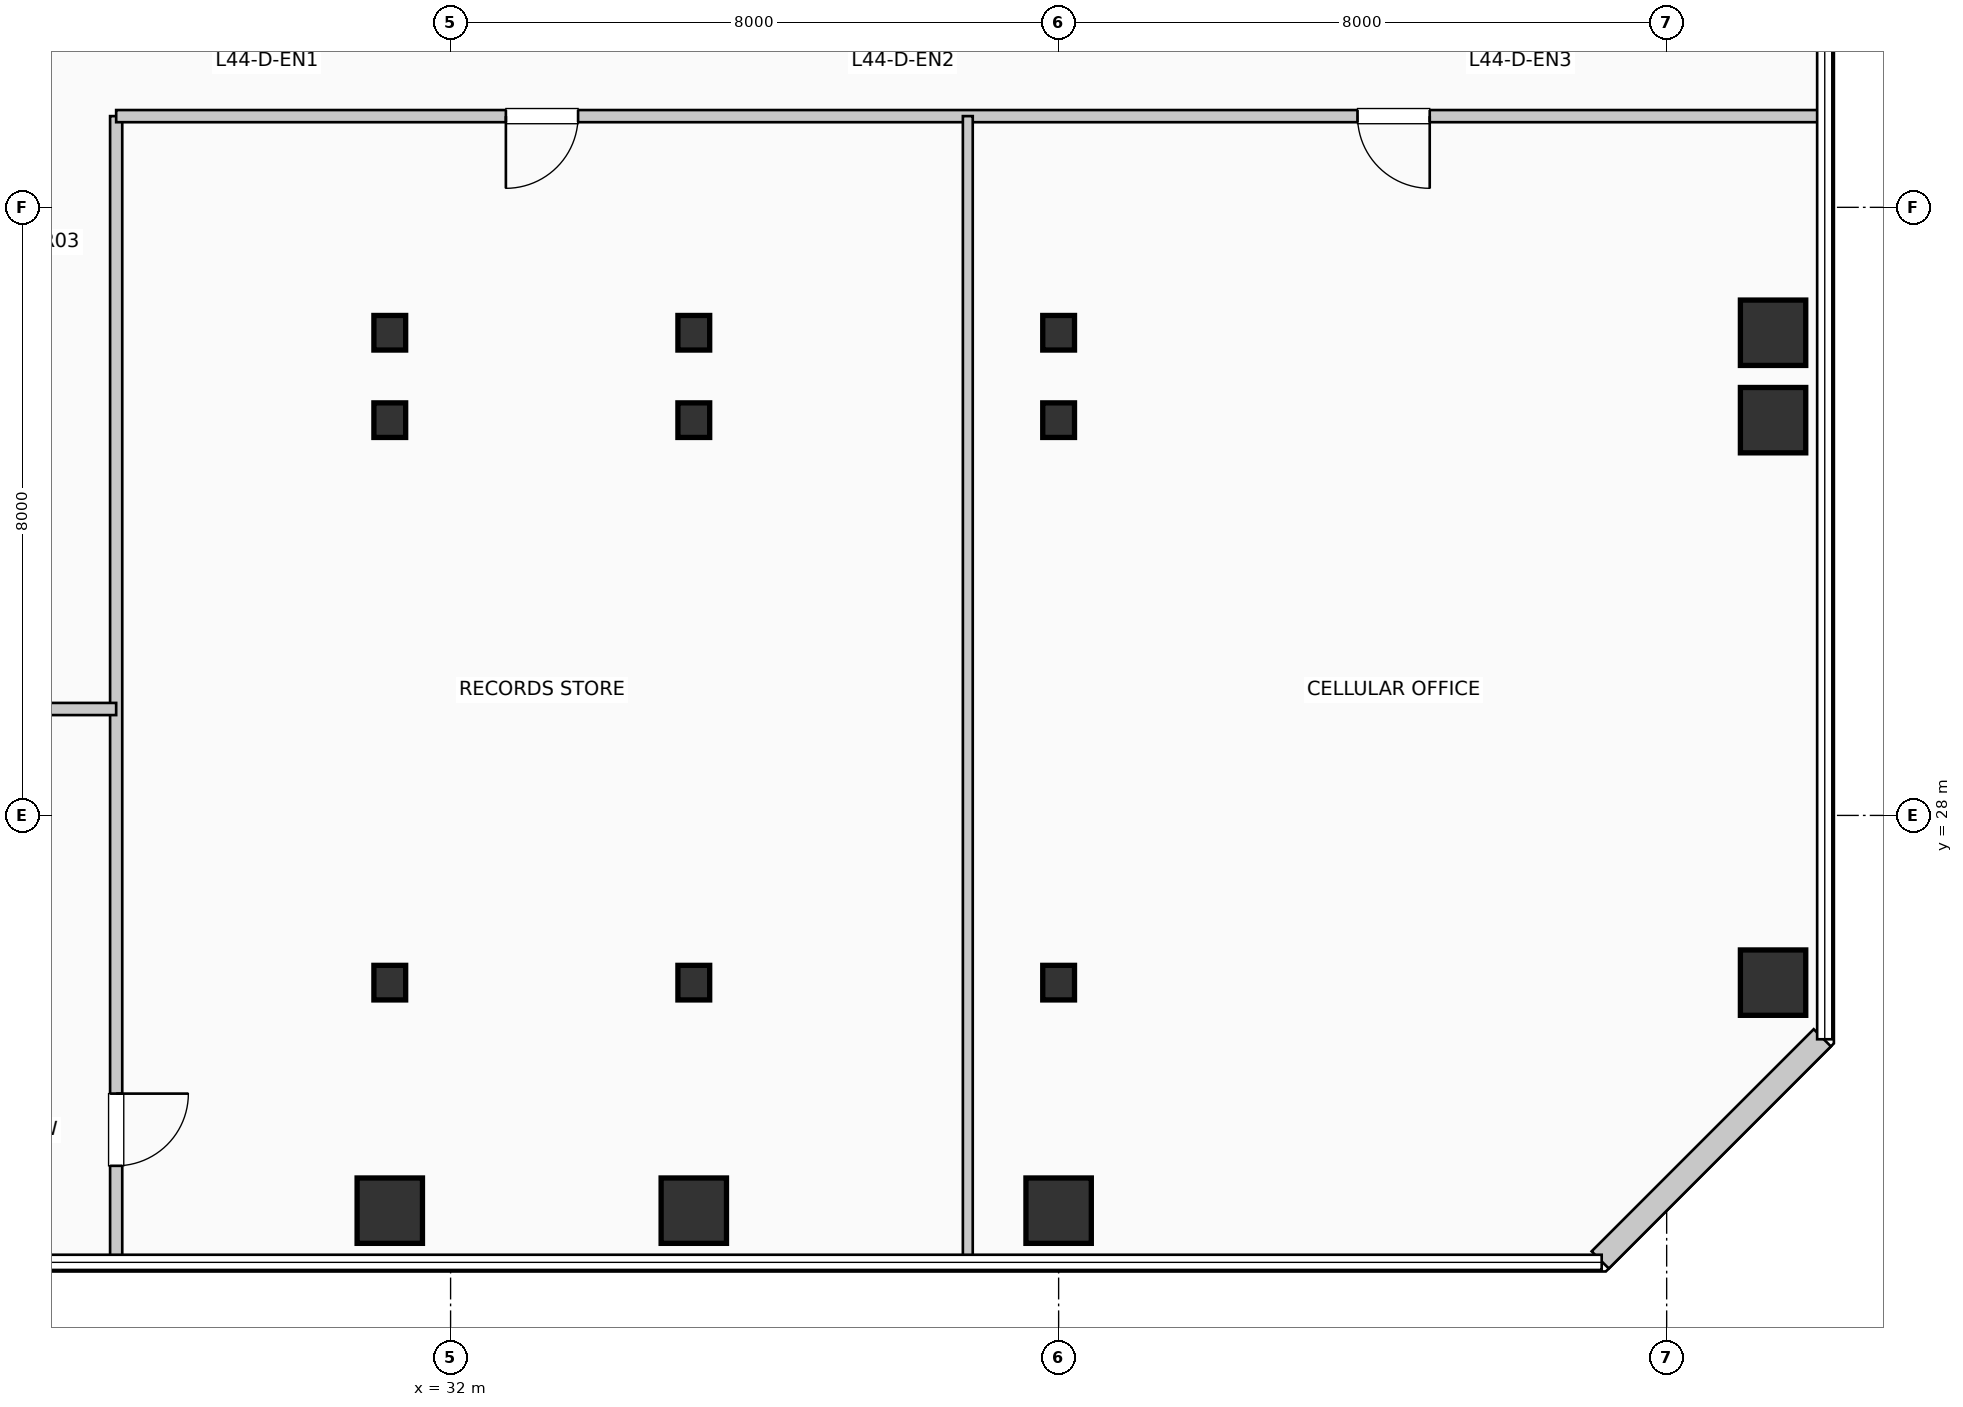
"""IFC4 building model, lengths in metres.
Left out: names, types, materials, properties, quantities, classifications, styles, units other than length and angle.
Written with IfcOpenShell. Run it as: python <this file> out.ifc"""

import sys

from ifc_helpers import new_model, si_unit, direction, frame, frame_2d, origin, origin_2d, place, context, subcontext, project, spatial, rectangle, i_section, extrude, element, fill, save


model = new_model("IFC4")
c1 = context("Model", 3, precision=1e-05, world=origin(), true_north=direction((0.0, 1.0)))
c2 = subcontext(c1, "Body", "Model", "MODEL_VIEW")
j1 = project(units=[si_unit("LENGTHUNIT", "METRE"), si_unit("PLANEANGLEUNIT", "RADIAN")], contexts=[c1])
p1 = place(None, origin())
s1 = spatial("IfcSite", under=j1, at=p1, CompositionType="ELEMENT")
p2 = place(p1, origin())
s2 = spatial("IfcBuilding", under=s1, at=p2, CompositionType="ELEMENT")
p3 = place(p2, frame((0.0, 0.0, 183.48)))
s3 = spatial("IfcBuildingStorey", under=s2, at=p3, CompositionType="ELEMENT", Elevation=183.48)
p4 = place(p3, frame((31.2, 22.8, 0.0), z_axis=(0.0, 0.0, 1.0), x_axis=(1.0, 0.0, 0.0)))
e1 = element("IfcColumn", 1, at=p4, inside=s3, PredefinedType="COLUMN", context=c2, shape_type="SweptSolid", body=[
    extrude(rectangle(XDim=0.86, YDim=0.86, at=origin_2d()), origin(), (0.0, 0.0, 1.0), 3.96),
])
for number, where, z_axis, x_axis in (
    (2, (31.2, 25.8, 0.0), (0.0, 0.0, 1.0), (1.0, 0.0, 0.0)),
    (3, (31.2, 33.2, 0.0), (0.0, 0.0, 1.0), (1.0, 0.0, 0.0)),
    (4, (31.2, 34.35, 0.0), (0.0, 0.0, 1.0), (1.0, 0.0, 0.0)),
):
    element("IfcColumn", number, at=place(p3, frame(where, z_axis=z_axis, x_axis=x_axis)), inside=s3, PredefinedType="COLUMN", context=c2, shape_type="SweptSolid", body=[
        extrude(i_section(OverallWidth=0.418, OverallDepth=0.455, WebThickness=0.032, FlangeThickness=0.051, at=origin_2d()), origin(), (0.0, 0.0, 1.0), 3.96),
    ])
p5 = place(p3, frame((35.2, 22.8, 0.0), z_axis=(0.0, 0.0, 1.0), x_axis=(1.0, 0.0, 0.0)))
e5 = element("IfcColumn", 5, at=p5, inside=s3, PredefinedType="COLUMN", context=c2, shape_type="SweptSolid", body=[
    extrude(rectangle(XDim=0.86, YDim=0.86, at=origin_2d()), origin(), (0.0, 0.0, 1.0), 3.96),
])
for number, where, z_axis, x_axis in (
    (6, (35.2, 25.8, 0.0), (0.0, 0.0, 1.0), (1.0, 0.0, 0.0)),
    (7, (35.2, 33.2, 0.0), (0.0, 0.0, 1.0), (1.0, 0.0, 0.0)),
    (8, (35.2, 34.35, 0.0), (0.0, 0.0, 1.0), (1.0, 0.0, 0.0)),
):
    element("IfcColumn", number, at=place(p3, frame(where, z_axis=z_axis, x_axis=x_axis)), inside=s3, PredefinedType="COLUMN", context=c2, shape_type="SweptSolid", body=[
        extrude(i_section(OverallWidth=0.418, OverallDepth=0.455, WebThickness=0.032, FlangeThickness=0.051, at=origin_2d()), origin(), (0.0, 0.0, 1.0), 3.96),
    ])
p6 = place(p3, frame((40.0, 22.8, 0.0), z_axis=(0.0, 0.0, 1.0), x_axis=(1.0, 0.0, 0.0)))
e9 = element("IfcColumn", 9, at=p6, inside=s3, PredefinedType="COLUMN", context=c2, shape_type="SweptSolid", body=[
    extrude(rectangle(XDim=0.86, YDim=0.86, at=origin_2d()), origin(), (0.0, 0.0, 1.0), 3.96),
])
for number, where, z_axis, x_axis in (
    (10, (40.0, 25.8, 0.0), (0.0, 0.0, 1.0), (1.0, 0.0, 0.0)),
    (11, (40.0, 33.2, 0.0), (0.0, 0.0, 1.0), (1.0, 0.0, 0.0)),
    (12, (40.0, 34.35, 0.0), (0.0, 0.0, 1.0), (1.0, 0.0, 0.0)),
):
    element("IfcColumn", number, at=place(p3, frame(where, z_axis=z_axis, x_axis=x_axis)), inside=s3, PredefinedType="COLUMN", context=c2, shape_type="SweptSolid", body=[
        extrude(i_section(OverallWidth=0.418, OverallDepth=0.455, WebThickness=0.032, FlangeThickness=0.051, at=origin_2d()), origin(), (0.0, 0.0, 1.0), 3.96),
    ])
for number, where, z_axis, x_axis in (
    (13, (49.4, 25.8, 0.0), (0.0, 0.0, 1.0), (1.0, 0.0, 0.0)),
    (14, (49.4, 33.2, 0.0), (0.0, 0.0, 1.0), (1.0, 0.0, 0.0)),
    (15, (49.4, 34.35, 0.0), (0.0, 0.0, 1.0), (1.0, 0.0, 0.0)),
):
    element("IfcColumn", number, at=place(p3, frame(where, z_axis=z_axis, x_axis=x_axis)), inside=s3, PredefinedType="COLUMN", context=c2, shape_type="SweptSolid", body=[
        extrude(rectangle(XDim=0.86, YDim=0.86, at=origin_2d()), origin(), (0.0, 0.0, 1.0), 3.96),
    ])
p7 = place(p3, frame((47.126, 22.152, 0.0), z_axis=(0.0, 0.0, 1.0), x_axis=(0.707136318428, 0.707077242712, 0.0)))
e16 = element("IfcWall", 16, at=p7, inside=s3, PredefinedType="SOLIDWALL", context=c2, shape_type="SweptSolid", body=[
    extrude(rectangle(XDim=4.133, YDim=0.32, at=frame_2d((2.066, 0.0))), origin(), (0.0, 0.0, 1.0), 3.71),
])
p8 = place(p3, frame((27.6, 22.19, 0.0), z_axis=(0.0, 0.0, 1.0), x_axis=(0.0, 1.0, 0.0)))
e17 = element("IfcWall", 17, at=p8, inside=s3, PredefinedType="PARTITIONING", context=c2, shape_type="SweptSolid", body=[
    extrude(rectangle(XDim=15.01, YDim=0.16, at=frame_2d((7.505, 0.0))), origin(), (0.0, 0.0, 1.0), 3.71),
])
p9 = place(p8, frame((2.15, 0.0, 0.0), z_axis=(0.0, 0.0, 1.0), x_axis=(-1.0, 0.0, 0.0)))
e18 = element("IfcOpeningElement", 18, at=p9, cuts=e17, PredefinedType="OPENING", context=c2, shape_type="SweptSolid", body=[
    extrude(rectangle(XDim=0.95, YDim=2.15, at=frame_2d((0.475, 1.075))), frame((0.0, 0.09, 0.0), z_axis=(0.0, -1.0, 0.0), x_axis=(1.0, 0.0, 0.0)), (0.0, 0.0, 1.0), 0.18),
])
p10 = place(p3, frame((23.45, 29.4, 0.0), z_axis=(0.0, 0.0, 1.0), x_axis=(1.0, 0.0, 0.0)))
e19 = element("IfcWall", 19, at=p10, inside=s3, PredefinedType="PARTITIONING", context=c2, shape_type="SweptSolid", body=[
    extrude(rectangle(XDim=4.15, YDim=0.16, at=frame_2d((2.075, 0.0))), origin(), (0.0, 0.0, 1.0), 3.365),
])
p11 = place(p3, frame((27.6, 37.2, 0.0), z_axis=(0.0, 0.0, 1.0), x_axis=(1.0, 0.0, 0.0)))
e20 = element("IfcWall", 20, at=p11, inside=s3, PredefinedType="PARTITIONING", context=c2, shape_type="SweptSolid", body=[
    extrude(rectangle(XDim=22.41, YDim=0.16, at=frame_2d((11.205, 0.0))), origin(), (0.0, 0.0, 1.0), 3.71),
])
p12 = place(p11, frame((6.077, 0.0, 0.0), z_axis=(0.0, 0.0, 1.0), x_axis=(-1.0, 0.0, 0.0)))
e21 = element("IfcOpeningElement", 21, at=p12, cuts=e20, PredefinedType="OPENING", context=c2, shape_type="SweptSolid", body=[
    extrude(rectangle(XDim=0.95, YDim=2.15, at=frame_2d((0.475, 1.075))), frame((0.0, 0.09, 0.0), z_axis=(0.0, -1.0, 0.0), x_axis=(1.0, 0.0, 0.0)), (0.0, 0.0, 1.0), 0.18),
])
p13 = place(p11, frame((17.282, 0.0, 0.0), z_axis=(0.0, 0.0, 1.0), x_axis=(-1.0, 0.0, 0.0)))
e22 = element("IfcOpeningElement", 22, at=p13, cuts=e20, PredefinedType="OPENING", context=c2, shape_type="SweptSolid", body=[
    extrude(rectangle(XDim=0.95, YDim=2.15, at=frame_2d((0.475, 1.075))), frame((0.0, 0.09, 0.0), z_axis=(0.0, -1.0, 0.0), x_axis=(1.0, 0.0, 0.0)), (0.0, 0.0, 1.0), 0.18),
])
p14 = place(p3, frame((38.805, 22.19, 0.0), z_axis=(0.0, 0.0, 1.0), x_axis=(0.0, 1.0, 0.0)))
e23 = element("IfcWall", 23, at=p14, inside=s3, PredefinedType="PARTITIONING", context=c2, shape_type="SweptSolid", body=[
    extrude(rectangle(XDim=15.01, YDim=0.13, at=frame_2d((7.505, 0.0))), origin(), (0.0, 0.0, 1.0), 3.71),
])
p15 = place(p9, origin())
e24 = element("IfcDoor", 24, at=p15, inside=s3, OperationType="SINGLE_SWING_RIGHT", PredefinedType="DOOR", context=c2, shape_type="SweptSolid", body=[
    extrude(rectangle(XDim=0.95, YDim=2.15, at=frame_2d((0.475, 1.075))), frame((0.0, 0.025, 0.0), z_axis=(0.0, -1.0, 0.0), x_axis=(1.0, 0.0, 0.0)), (0.0, 0.0, 1.0), 0.05),
])
fill(e18, e24)
p16 = place(p12, origin())
e25 = element("IfcDoor", 25, at=p16, inside=s3, OperationType="SINGLE_SWING_LEFT", PredefinedType="DOOR", context=c2, shape_type="SweptSolid", body=[
    extrude(rectangle(XDim=0.95, YDim=2.15, at=frame_2d((0.475, 1.075))), frame((0.0, 0.025, 0.0), z_axis=(0.0, -1.0, 0.0), x_axis=(1.0, 0.0, 0.0)), (0.0, 0.0, 1.0), 0.05),
])
fill(e21, e25)
p17 = place(p13, origin())
e26 = element("IfcDoor", 26, at=p17, inside=s3, OperationType="SINGLE_SWING_RIGHT", PredefinedType="DOOR", context=c2, shape_type="SweptSolid", body=[
    extrude(rectangle(XDim=0.95, YDim=2.15, at=frame_2d((0.475, 1.075))), frame((0.0, 0.025, 0.0), z_axis=(0.0, -1.0, 0.0), x_axis=(1.0, 0.0, 0.0)), (0.0, 0.0, 1.0), 0.05),
])
fill(e22, e26)
save(model, sys.argv[1])
